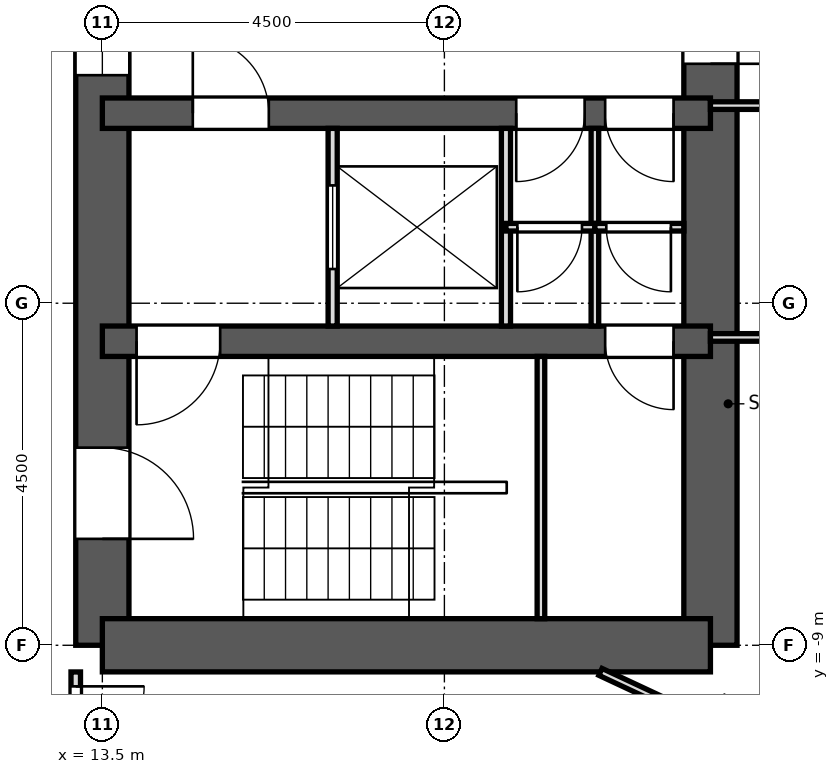
"""IFC4 building model, lengths in metres.
Left out: names, types, materials, properties, quantities, classifications, styles, units other than length and angle.
Written with IfcOpenShell. Run it as: python <this file> out.ifc"""

import sys

from ifc_helpers import new_model, si_unit, direction, frame, frame_2d, origin, place, context, subcontext, project, spatial, rectangle, extrude, element, fill, save


model = new_model("IFC4")
c1 = context("Model", 3, precision=1e-05, world=origin(), true_north=direction((0.0, 1.0)))
c2 = subcontext(c1, "Body", "Model", "MODEL_VIEW")
j1 = project(units=[si_unit("LENGTHUNIT", "METRE"), si_unit("PLANEANGLEUNIT", "RADIAN")], contexts=[c1])
p1 = place(None, origin())
s1 = spatial("IfcSite", under=j1, at=p1, CompositionType="ELEMENT")
p2 = place(p1, origin())
s2 = spatial("IfcBuilding", under=s1, at=p2, CompositionType="ELEMENT")
p3 = place(p2, frame((0.0, 0.0, 190.5)))
s3 = spatial("IfcBuildingStorey", under=s2, at=p3, CompositionType="ELEMENT", Elevation=190.5)
p4 = place(p3, frame((13.5, -9.0, 0.0), z_axis=(0.0, 0.0, 1.0), x_axis=(0.0, 1.0, 0.0)))
e1 = element("IfcWall", 1, at=p4, inside=s3, PredefinedType="SHEAR", context=c2, shape_type="SweptSolid", body=[
    extrude(rectangle(XDim=18.0, YDim=0.7, at=frame_2d((9.0, 0.0))), origin(), (0.0, 0.0, 1.0), 3.3),
])
p5 = place(p4, frame((15.4, 0.0, 0.0)))
e2 = element("IfcOpeningElement", 2, at=p5, cuts=e1, PredefinedType="OPENING", context=c2, shape_type="SweptSolid", body=[
    extrude(rectangle(XDim=1.2, YDim=2.1, at=frame_2d((0.6, 1.05))), frame((0.0, 0.362, 0.0), z_axis=(0.0, -1.0, 0.0), x_axis=(1.0, 0.0, 0.0)), (0.0, 0.0, 1.0), 0.724),
])
p6 = place(p4, frame((1.4, 0.0, 0.0)))
e3 = element("IfcOpeningElement", 3, at=p6, cuts=e1, PredefinedType="OPENING", context=c2, shape_type="SweptSolid", body=[
    extrude(rectangle(XDim=1.2, YDim=2.1, at=frame_2d((0.6, 1.05))), frame((0.0, 0.362, 0.0), z_axis=(0.0, -1.0, 0.0), x_axis=(1.0, 0.0, 0.0)), (0.0, 0.0, 1.0), 0.724),
])
p7 = place(p4, frame((7.5, 0.0, 0.0)))
e4 = element("IfcOpeningElement", 4, at=p7, cuts=e1, PredefinedType="OPENING", context=c2, shape_type="SweptSolid", body=[
    extrude(rectangle(XDim=3.0, YDim=2.4, at=frame_2d((1.5, 1.2))), frame((0.0, 0.362, 0.0), z_axis=(0.0, -1.0, 0.0), x_axis=(1.0, 0.0, 0.0)), (0.0, 0.0, 1.0), 0.724),
])
p8 = place(p3, frame((21.5, -9.0, 0.0), z_axis=(0.0, 0.0, 1.0), x_axis=(0.0, 1.0, 0.0)))
e5 = element("IfcWall", 5, at=p8, inside=s3, PredefinedType="SHEAR", context=c2, shape_type="SweptSolid", body=[
    extrude(rectangle(XDim=18.0, YDim=0.7, at=frame_2d((9.0, 0.0))), origin(), (0.0, 0.0, 1.0), 3.3),
])
p9 = place(p8, frame((9.45, 0.0, 0.0)))
e6 = element("IfcOpeningElement", 6, at=p9, cuts=e5, PredefinedType="OPENING", context=c2, shape_type="SweptSolid", body=[
    extrude(rectangle(XDim=0.9, YDim=2.1, at=frame_2d((0.45, 1.05))), frame((0.0, 0.362, 0.0), z_axis=(0.0, -1.0, 0.0), x_axis=(1.0, 0.0, 0.0)), (0.0, 0.0, 1.0), 0.724),
])
p10 = place(p8, frame((7.65, 0.0, 0.0)))
e7 = element("IfcOpeningElement", 7, at=p10, cuts=e5, PredefinedType="OPENING", context=c2, shape_type="SweptSolid", body=[
    extrude(rectangle(XDim=0.9, YDim=2.1, at=frame_2d((0.45, 1.05))), frame((0.0, 0.362, 0.0), z_axis=(0.0, -1.0, 0.0), x_axis=(1.0, 0.0, 0.0)), (0.0, 0.0, 1.0), 0.724),
])
p11 = place(p3, frame((13.5, -9.0, 0.0), z_axis=(0.0, 0.0, 1.0), x_axis=(1.0, 0.0, 0.0)))
e8 = element("IfcWall", 8, at=p11, inside=s3, PredefinedType="SHEAR", context=c2, shape_type="SweptSolid", body=[
    extrude(rectangle(XDim=8.0, YDim=0.7, at=frame_2d((4.0, 0.0))), origin(), (0.0, 0.0, 1.0), 3.3),
])
p12 = place(p3, frame((13.5, -5.0, 0.0), z_axis=(0.0, 0.0, 1.0), x_axis=(1.0, 0.0, 0.0)))
e9 = element("IfcWall", 9, at=p12, inside=s3, PredefinedType="SHEAR", context=c2, shape_type="SweptSolid", body=[
    extrude(rectangle(XDim=8.0, YDim=0.4, at=frame_2d((4.0, 0.0))), origin(), (0.0, 0.0, 1.0), 3.3),
])
p13 = place(p12, frame((6.615, 0.0, 0.0)))
e10 = element("IfcOpeningElement", 10, at=p13, cuts=e9, PredefinedType="OPENING", context=c2, shape_type="SweptSolid", body=[
    extrude(rectangle(XDim=0.9, YDim=2.1, at=frame_2d((0.45, 1.05))), frame((0.0, 0.212, 0.0), z_axis=(0.0, -1.0, 0.0), x_axis=(1.0, 0.0, 0.0)), (0.0, 0.0, 1.0), 0.424),
])
p14 = place(p12, frame((0.45, 0.0, 0.0)))
e11 = element("IfcOpeningElement", 11, at=p14, cuts=e9, PredefinedType="OPENING", context=c2, shape_type="SweptSolid", body=[
    extrude(rectangle(XDim=1.1, YDim=2.1, at=frame_2d((0.55, 1.05))), frame((0.0, 0.212, 0.0), z_axis=(0.0, -1.0, 0.0), x_axis=(1.0, 0.0, 0.0)), (0.0, 0.0, 1.0), 0.424),
])
p15 = place(p3, frame((13.5, -2.0, 0.0), z_axis=(0.0, 0.0, 1.0), x_axis=(1.0, 0.0, 0.0)))
e12 = element("IfcWall", 12, at=p15, inside=s3, PredefinedType="SHEAR", context=c2, shape_type="SweptSolid", body=[
    extrude(rectangle(XDim=8.0, YDim=0.4, at=frame_2d((4.0, 0.0))), origin(), (0.0, 0.0, 1.0), 3.3),
])
p16 = place(p15, frame((1.19, 0.0, 0.0)))
e13 = element("IfcOpeningElement", 13, at=p16, cuts=e12, PredefinedType="OPENING", context=c2, shape_type="SweptSolid", body=[
    extrude(rectangle(XDim=1.0, YDim=2.1, at=frame_2d((0.5, 1.05))), frame((0.0, 0.212, 0.0), z_axis=(0.0, -1.0, 0.0), x_axis=(1.0, 0.0, 0.0)), (0.0, 0.0, 1.0), 0.424),
])
p17 = place(p15, frame((5.445, 0.0, 0.0)))
e14 = element("IfcOpeningElement", 14, at=p17, cuts=e12, PredefinedType="OPENING", context=c2, shape_type="SweptSolid", body=[
    extrude(rectangle(XDim=0.9, YDim=2.1, at=frame_2d((0.45, 1.05))), frame((0.0, 0.212, 0.0), z_axis=(0.0, -1.0, 0.0), x_axis=(1.0, 0.0, 0.0)), (0.0, 0.0, 1.0), 0.424),
])
p18 = place(p15, frame((6.615, 0.0, 0.0)))
e15 = element("IfcOpeningElement", 15, at=p18, cuts=e12, PredefinedType="OPENING", context=c2, shape_type="SweptSolid", body=[
    extrude(rectangle(XDim=0.9, YDim=2.1, at=frame_2d((0.45, 1.05))), frame((0.0, 0.212, 0.0), z_axis=(0.0, -1.0, 0.0), x_axis=(1.0, 0.0, 0.0)), (0.0, 0.0, 1.0), 0.424),
])
p19 = place(p3, frame((20.053, -9.35, 0.0), z_axis=(0.0, 0.0, 1.0), x_axis=(0.906055596822, -0.423158664648, 0.0)))
e16 = element("IfcWall", 16, at=p19, inside=s3, PredefinedType="PARTITIONING", context=c2, shape_type="SweptSolid", body=[
    extrude(rectangle(XDim=1.614, YDim=0.1, at=frame_2d((0.807, 0.0))), origin(), (0.0, 0.0, 1.0), 2.85),
])
p20 = place(p3, frame((13.15, -11.567, 0.0), z_axis=(0.0, 0.0, 1.0), x_axis=(0.0, 1.0, 0.0)))
e17 = element("IfcWall", 17, at=p20, inside=s3, PredefinedType="PARTITIONING", context=c2, shape_type="SweptSolid", body=[
    extrude(rectangle(XDim=2.216, YDim=0.125, at=frame_2d((1.108, 0.0))), origin(), (0.0, 0.0, 1.0), 2.85),
])
p21 = place(p20, frame((1.127, 0.0, 0.0)))
e18 = element("IfcOpeningElement", 18, at=p21, cuts=e17, PredefinedType="OPENING", context=c2, shape_type="SweptSolid", body=[
    extrude(rectangle(XDim=0.9, YDim=2.1, at=frame_2d((0.45, 1.05))), frame((0.0, 0.074, 0.0), z_axis=(0.0, -1.0, 0.0), x_axis=(1.0, 0.0, 0.0)), (0.0, 0.0, 1.0), 0.149),
])
p22 = place(p3, frame((21.5, -4.95, 0.0), z_axis=(0.0, 0.0, 1.0), x_axis=(1.0, 0.0, 0.0)))
e19 = element("IfcWall", 19, at=p22, inside=s3, PredefinedType="PARTITIONING", context=c2, shape_type="SweptSolid", body=[
    extrude(rectangle(XDim=2.307, YDim=0.1, at=frame_2d((1.153, 0.0))), origin(), (0.0, 0.0, 1.0), 2.85),
])
p23 = place(p3, frame((21.5, -1.9, 0.0), z_axis=(0.0, 0.0, 1.0), x_axis=(1.0, 0.0, 0.0)))
e20 = element("IfcWall", 20, at=p23, inside=s3, PredefinedType="PARTITIONING", context=c2, shape_type="SweptSolid", body=[
    extrude(rectangle(XDim=2.805, YDim=0.1, at=frame_2d((1.402, 0.0))), origin(), (0.0, 0.0, 1.0), 2.85),
])
p24 = place(p23, frame((0.952, 0.0, 0.0)))
e21 = element("IfcOpeningElement", 21, at=p24, cuts=e20, PredefinedType="OPENING", context=c2, shape_type="SweptSolid", body=[
    extrude(rectangle(XDim=0.9, YDim=2.1, at=frame_2d((0.45, 1.05))), frame((0.0, 0.062, 0.0), z_axis=(0.0, -1.0, 0.0), x_axis=(1.0, 0.0, 0.0)), (0.0, 0.0, 1.0), 0.124),
])
p25 = place(p3, frame((16.53, -4.8, 0.0), z_axis=(0.0, 0.0, 1.0), x_axis=(0.0, 1.0, 0.0)))
e22 = element("IfcWall", 22, at=p25, inside=s3, PredefinedType="PARTITIONING", context=c2, shape_type="SweptSolid", body=[
    extrude(rectangle(XDim=2.6, YDim=0.12, at=frame_2d((1.3, 0.0))), origin(), (0.0, 0.0, 1.0), 2.85),
])
p26 = place(p25, frame((0.75, 0.0, 0.0)))
e23 = element("IfcOpeningElement", 23, at=p26, cuts=e22, PredefinedType="OPENING", context=c2, shape_type="SweptSolid", body=[
    extrude(rectangle(XDim=1.1, YDim=2.1, at=frame_2d((0.55, 1.05))), frame((0.0, 0.072, 0.0), z_axis=(0.0, -1.0, 0.0), x_axis=(1.0, 0.0, 0.0)), (0.0, 0.0, 1.0), 0.144),
])
p27 = place(p3, frame((18.81, -4.8, 0.0), z_axis=(0.0, 0.0, 1.0), x_axis=(0.0, 1.0, 0.0)))
e24 = element("IfcWall", 24, at=p27, inside=s3, PredefinedType="PARTITIONING", context=c2, shape_type="SweptSolid", body=[
    extrude(rectangle(XDim=2.6, YDim=0.12, at=frame_2d((1.3, 0.0))), origin(), (0.0, 0.0, 1.0), 2.85),
])
p28 = place(p3, frame((19.98, -4.8, 0.0), z_axis=(0.0, 0.0, 1.0), x_axis=(0.0, 1.0, 0.0)))
e25 = element("IfcWall", 25, at=p28, inside=s3, PredefinedType="PARTITIONING", context=c2, shape_type="SweptSolid", body=[
    extrude(rectangle(XDim=2.6, YDim=0.1, at=frame_2d((1.3, 0.0))), origin(), (0.0, 0.0, 1.0), 2.85),
])
p29 = place(p3, frame((18.81, -3.5, 0.0), z_axis=(0.0, 0.0, 1.0), x_axis=(1.0, 0.0, 0.0)))
e26 = element("IfcWall", 26, at=p29, inside=s3, PredefinedType="PARTITIONING", context=c2, shape_type="SweptSolid", body=[
    extrude(rectangle(XDim=1.17, YDim=0.1, at=frame_2d((0.585, 0.0))), origin(), (0.0, 0.0, 1.0), 2.85),
])
p30 = place(p29, frame((0.15, 0.0, 0.0)))
e27 = element("IfcOpeningElement", 27, at=p30, cuts=e26, PredefinedType="OPENING", context=c2, shape_type="SweptSolid", body=[
    extrude(rectangle(XDim=0.85, YDim=2.1, at=frame_2d((0.425, 1.05))), frame((0.0, 0.062, 0.0), z_axis=(0.0, -1.0, 0.0), x_axis=(1.0, 0.0, 0.0)), (0.0, 0.0, 1.0), 0.124),
])
p31 = place(p3, frame((19.98, -3.5, 0.0), z_axis=(0.0, 0.0, 1.0), x_axis=(1.0, 0.0, 0.0)))
e28 = element("IfcWall", 28, at=p31, inside=s3, PredefinedType="PARTITIONING", context=c2, shape_type="SweptSolid", body=[
    extrude(rectangle(XDim=1.17, YDim=0.1, at=frame_2d((0.585, 0.0))), origin(), (0.0, 0.0, 1.0), 2.85),
])
p32 = place(p31, frame((0.15, 0.0, 0.0)))
e29 = element("IfcOpeningElement", 29, at=p32, cuts=e28, PredefinedType="OPENING", context=c2, shape_type="SweptSolid", body=[
    extrude(rectangle(XDim=0.85, YDim=2.1, at=frame_2d((0.425, 1.05))), frame((0.0, 0.062, 0.0), z_axis=(0.0, -1.0, 0.0), x_axis=(1.0, 0.0, 0.0)), (0.0, 0.0, 1.0), 0.124),
])
p33 = place(p3, frame((19.27, -8.65, 0.0), z_axis=(0.0, 0.0, 1.0), x_axis=(0.0, 1.0, 0.0)))
e30 = element("IfcWall", 30, at=p33, inside=s3, PredefinedType="PARTITIONING", context=c2, shape_type="SweptSolid", body=[
    extrude(rectangle(XDim=3.45, YDim=0.1, at=frame_2d((1.725, 0.0))), origin(), (0.0, 0.0, 1.0), 2.85),
])
p34 = place(p21, frame((0.9, 0.0, 0.0), z_axis=(0.0, 0.0, 1.0), x_axis=(-1.0, 0.0, 0.0)))
e31 = element("IfcDoor", 31, at=p34, inside=s3, OperationType="SINGLE_SWING_LEFT", PredefinedType="DOOR", context=c2, shape_type="SweptSolid", body=[
    extrude(rectangle(XDim=0.9, YDim=2.1, at=frame_2d((0.45, 1.05))), frame((0.0, 0.025, 0.0), z_axis=(0.0, -1.0, 0.0), x_axis=(1.0, 0.0, 0.0)), (0.0, 0.0, 1.0), 0.05),
])
fill(e18, e31)
p35 = place(p26, origin())
e32 = element("IfcDoor", 32, at=p35, inside=s3, OperationType="DOUBLE_DOOR_SLIDING", PredefinedType="DOOR", context=c2, shape_type="SweptSolid", body=[
    extrude(rectangle(XDim=1.1, YDim=2.1, at=frame_2d((0.55, 1.05))), frame((0.0, 0.025, 0.0), z_axis=(0.0, -1.0, 0.0), x_axis=(1.0, 0.0, 0.0)), (0.0, 0.0, 1.0), 0.05),
])
fill(e23, e32)
p36 = place(p16, origin())
e33 = element("IfcDoor", 33, at=p36, inside=s3, OperationType="SINGLE_SWING_LEFT", PredefinedType="DOOR", context=c2, shape_type="SweptSolid", body=[
    extrude(rectangle(XDim=1.0, YDim=2.1, at=frame_2d((0.5, 1.05))), frame((0.0, 0.025, 0.0), z_axis=(0.0, -1.0, 0.0), x_axis=(1.0, 0.0, 0.0)), (0.0, 0.0, 1.0), 0.05),
])
fill(e13, e33)
p37 = place(p17, frame((0.9, 0.0, 0.0), z_axis=(0.0, 0.0, 1.0), x_axis=(-1.0, 0.0, 0.0)))
e34 = element("IfcDoor", 34, at=p37, inside=s3, OperationType="SINGLE_SWING_RIGHT", PredefinedType="DOOR", context=c2, shape_type="SweptSolid", body=[
    extrude(rectangle(XDim=0.9, YDim=2.1, at=frame_2d((0.45, 1.05))), frame((0.0, 0.025, 0.0), z_axis=(0.0, -1.0, 0.0), x_axis=(1.0, 0.0, 0.0)), (0.0, 0.0, 1.0), 0.05),
])
fill(e14, e34)
p38 = place(p18, frame((0.9, 0.0, 0.0), z_axis=(0.0, 0.0, 1.0), x_axis=(-1.0, 0.0, 0.0)))
e35 = element("IfcDoor", 35, at=p38, inside=s3, OperationType="SINGLE_SWING_LEFT", PredefinedType="DOOR", context=c2, shape_type="SweptSolid", body=[
    extrude(rectangle(XDim=0.9, YDim=2.1, at=frame_2d((0.45, 1.05))), frame((0.0, 0.025, 0.0), z_axis=(0.0, -1.0, 0.0), x_axis=(1.0, 0.0, 0.0)), (0.0, 0.0, 1.0), 0.05),
])
fill(e15, e35)
p39 = place(p10, frame((0.9, 0.0, 0.0), z_axis=(0.0, 0.0, 1.0), x_axis=(-1.0, 0.0, 0.0)))
e36 = element("IfcDoor", 36, at=p39, inside=s3, OperationType="SINGLE_SWING_RIGHT", PredefinedType="DOOR", context=c2, shape_type="SweptSolid", body=[
    extrude(rectangle(XDim=0.9, YDim=2.1, at=frame_2d((0.45, 1.05))), frame((0.0, 0.025, 0.0), z_axis=(0.0, -1.0, 0.0), x_axis=(1.0, 0.0, 0.0)), (0.0, 0.0, 1.0), 0.05),
])
fill(e7, e36)
p40 = place(p30, frame((0.85, 0.0, 0.0), z_axis=(0.0, 0.0, 1.0), x_axis=(-1.0, 0.0, 0.0)))
e37 = element("IfcDoor", 37, at=p40, inside=s3, OperationType="SINGLE_SWING_RIGHT", PredefinedType="DOOR", context=c2, shape_type="SweptSolid", body=[
    extrude(rectangle(XDim=0.85, YDim=2.1, at=frame_2d((0.425, 1.05))), frame((0.0, 0.025, 0.0), z_axis=(0.0, -1.0, 0.0), x_axis=(1.0, 0.0, 0.0)), (0.0, 0.0, 1.0), 0.05),
])
fill(e27, e37)
p41 = place(p32, frame((0.85, 0.0, 0.0), z_axis=(0.0, 0.0, 1.0), x_axis=(-1.0, 0.0, 0.0)))
e38 = element("IfcDoor", 38, at=p41, inside=s3, OperationType="SINGLE_SWING_LEFT", PredefinedType="DOOR", context=c2, shape_type="SweptSolid", body=[
    extrude(rectangle(XDim=0.85, YDim=2.1, at=frame_2d((0.425, 1.05))), frame((0.0, 0.025, 0.0), z_axis=(0.0, -1.0, 0.0), x_axis=(1.0, 0.0, 0.0)), (0.0, 0.0, 1.0), 0.05),
])
fill(e29, e38)
p42 = place(p13, frame((0.9, 0.0, 0.0), z_axis=(0.0, 0.0, 1.0), x_axis=(-1.0, 0.0, 0.0)))
e39 = element("IfcDoor", 39, at=p42, inside=s3, OperationType="SINGLE_SWING_LEFT", PredefinedType="DOOR", context=c2, shape_type="SweptSolid", body=[
    extrude(rectangle(XDim=0.9, YDim=2.1, at=frame_2d((0.45, 1.05))), frame((0.0, 0.025, 0.0), z_axis=(0.0, -1.0, 0.0), x_axis=(1.0, 0.0, 0.0)), (0.0, 0.0, 1.0), 0.05),
])
fill(e10, e39)
p43 = place(p14, frame((1.1, 0.0, 0.0), z_axis=(0.0, 0.0, 1.0), x_axis=(-1.0, 0.0, 0.0)))
e40 = element("IfcDoor", 40, at=p43, inside=s3, OperationType="SINGLE_SWING_RIGHT", PredefinedType="DOOR", context=c2, shape_type="SweptSolid", body=[
    extrude(rectangle(XDim=1.1, YDim=2.1, at=frame_2d((0.55, 1.05))), frame((0.0, 0.025, 0.0), z_axis=(0.0, -1.0, 0.0), x_axis=(1.0, 0.0, 0.0)), (0.0, 0.0, 1.0), 0.05),
])
fill(e11, e40)
p44 = place(p6, frame((1.2, 0.0, 0.0), z_axis=(0.0, 0.0, 1.0), x_axis=(-1.0, 0.0, 0.0)))
e41 = element("IfcDoor", 41, at=p44, inside=s3, OperationType="SINGLE_SWING_RIGHT", PredefinedType="DOOR", context=c2, shape_type="SweptSolid", body=[
    extrude(rectangle(XDim=1.2, YDim=2.1, at=frame_2d((0.6, 1.05))), frame((0.0, 0.025, 0.0), z_axis=(0.0, -1.0, 0.0), x_axis=(1.0, 0.0, 0.0)), (0.0, 0.0, 1.0), 0.05),
])
fill(e3, e41)
p45 = place(p7, origin())
e42 = element("IfcDoor", 42, at=p45, inside=s3, OperationType="DOUBLE_DOOR_SLIDING", PredefinedType="DOOR", context=c2, shape_type="SweptSolid", body=[
    extrude(rectangle(XDim=3.0, YDim=2.4, at=frame_2d((1.5, 1.2))), frame((0.0, 0.025, 0.0), z_axis=(0.0, -1.0, 0.0), x_axis=(1.0, 0.0, 0.0)), (0.0, 0.0, 1.0), 0.05),
])
fill(e4, e42)
save(model, sys.argv[1])
